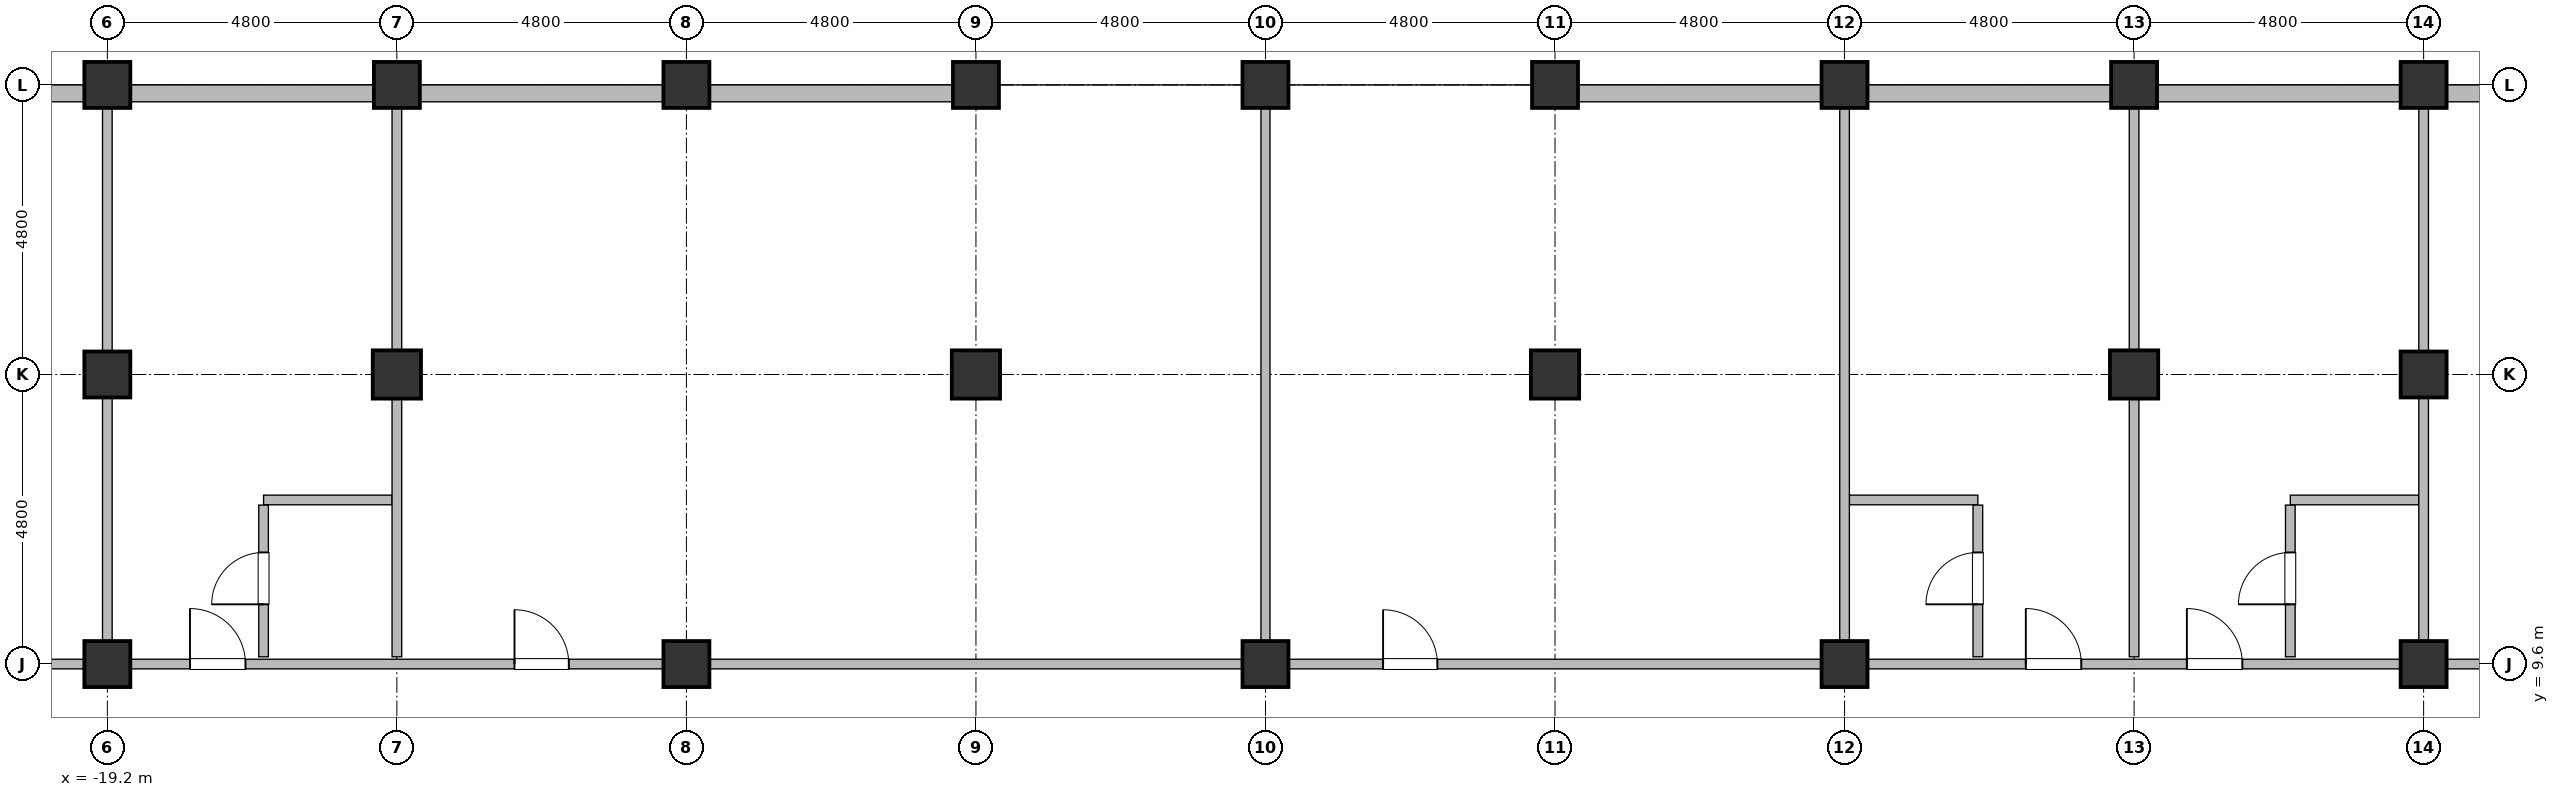
"""IFC4 building model, lengths in metres.
Left out: names, types, materials, properties, quantities, classifications, styles, units other than length and angle.
Written with IfcOpenShell. Run it as: python <this file> out.ifc"""

import sys

from ifc_helpers import new_model, si_unit, direction, frame, frame_2d, origin, origin_2d, place, context, subcontext, project, spatial, rectangle, hollow_rectangle, hollow_circle, extrude, element, fill, save


model = new_model("IFC4")
c1 = context("Model", 3, precision=1e-05, world=origin(), true_north=direction((0.0, 1.0)))
c2 = subcontext(c1, "Body", "Model", "MODEL_VIEW")
j1 = project(units=[si_unit("LENGTHUNIT", "METRE"), si_unit("PLANEANGLEUNIT", "RADIAN")], contexts=[c1])
p1 = place(None, origin())
s1 = spatial("IfcSite", under=j1, at=p1, CompositionType="ELEMENT")
p2 = place(p1, origin())
s2 = spatial("IfcBuilding", under=s1, at=p2, CompositionType="ELEMENT")
p3 = place(p2, frame((0.0, 0.0, 48.5)))
s3 = spatial("IfcBuildingStorey", under=s2, at=p3, CompositionType="ELEMENT", Elevation=48.5)
for number, where, z_axis, x_axis in (
    (1, (-19.2, 9.6, 0.0), (0.0, 0.0, 1.0), (1.0, 0.0, 0.0)),
    (2, (-19.2, 14.4, 0.0), (0.0, 0.0, 1.0), (1.0, 0.0, 0.0)),
    (3, (-19.2, 19.2, 0.0), (0.0, 0.0, 1.0), (1.0, 0.0, 0.0)),
):
    element("IfcColumn", number, at=place(p3, frame(where, z_axis=z_axis, x_axis=x_axis)), inside=s3, PredefinedType="COLUMN", context=c2, shape_type="SweptSolid", body=[
        extrude(hollow_circle(Radius=0.381, WallThickness=0.032, at=origin_2d()), origin(), (0.0, 0.0, 1.0), 3.7),
    ])
p4 = place(p3, frame((-14.4, 14.4, 0.0), z_axis=(0.0, 0.0, 1.0), x_axis=(1.0, 0.0, 0.0)))
e4 = element("IfcColumn", 4, at=p4, inside=s3, PredefinedType="COLUMN", context=c2, shape_type="SweptSolid", body=[
    extrude(hollow_rectangle(XDim=0.8, YDim=0.8, WallThickness=0.036, at=origin_2d()), origin(), (0.0, 0.0, 1.0), 3.7),
])
for number, where, z_axis, x_axis in (
    (5, (-14.4, 19.2, 0.0), (0.0, 0.0, 1.0), (1.0, 0.0, 0.0)),
    (6, (-9.6, 9.6, 0.0), (0.0, 0.0, 1.0), (1.0, 0.0, 0.0)),
    (7, (-9.6, 19.2, 0.0), (0.0, 0.0, 1.0), (1.0, 0.0, 0.0)),
):
    element("IfcColumn", number, at=place(p3, frame(where, z_axis=z_axis, x_axis=x_axis)), inside=s3, PredefinedType="COLUMN", context=c2, shape_type="SweptSolid", body=[
        extrude(hollow_circle(Radius=0.381, WallThickness=0.032, at=origin_2d()), origin(), (0.0, 0.0, 1.0), 3.7),
    ])
p5 = place(p3, frame((-4.8, 14.4, 0.0), z_axis=(0.0, 0.0, 1.0), x_axis=(1.0, 0.0, 0.0)))
e8 = element("IfcColumn", 8, at=p5, inside=s3, PredefinedType="COLUMN", context=c2, shape_type="SweptSolid", body=[
    extrude(hollow_rectangle(XDim=0.8, YDim=0.8, WallThickness=0.036, at=origin_2d()), origin(), (0.0, 0.0, 1.0), 3.7),
])
for number, where, z_axis, x_axis in (
    (9, (-4.8, 19.2, 0.0), (0.0, 0.0, 1.0), (1.0, 0.0, 0.0)),
    (10, (0.0, 9.6, 0.0), (0.0, 0.0, 1.0), (1.0, 0.0, 0.0)),
    (11, (0.0, 19.2, 0.0), (0.0, 0.0, 1.0), (1.0, 0.0, 0.0)),
):
    element("IfcColumn", number, at=place(p3, frame(where, z_axis=z_axis, x_axis=x_axis)), inside=s3, PredefinedType="COLUMN", context=c2, shape_type="SweptSolid", body=[
        extrude(hollow_circle(Radius=0.381, WallThickness=0.032, at=origin_2d()), origin(), (0.0, 0.0, 1.0), 3.7),
    ])
p6 = place(p3, frame((4.8, 14.4, 0.0), z_axis=(0.0, 0.0, 1.0), x_axis=(1.0, 0.0, 0.0)))
e12 = element("IfcColumn", 12, at=p6, inside=s3, PredefinedType="COLUMN", context=c2, shape_type="SweptSolid", body=[
    extrude(hollow_rectangle(XDim=0.8, YDim=0.8, WallThickness=0.036, at=origin_2d()), origin(), (0.0, 0.0, 1.0), 3.7),
])
for number, where, z_axis, x_axis in (
    (13, (4.8, 19.2, 0.0), (0.0, 0.0, 1.0), (1.0, 0.0, 0.0)),
    (14, (9.6, 9.6, 0.0), (0.0, 0.0, 1.0), (1.0, 0.0, 0.0)),
    (15, (9.6, 19.2, 0.0), (0.0, 0.0, 1.0), (1.0, 0.0, 0.0)),
):
    element("IfcColumn", number, at=place(p3, frame(where, z_axis=z_axis, x_axis=x_axis)), inside=s3, PredefinedType="COLUMN", context=c2, shape_type="SweptSolid", body=[
        extrude(hollow_circle(Radius=0.381, WallThickness=0.032, at=origin_2d()), origin(), (0.0, 0.0, 1.0), 3.7),
    ])
p7 = place(p3, frame((14.4, 14.4, 0.0), z_axis=(0.0, 0.0, 1.0), x_axis=(1.0, 0.0, 0.0)))
e16 = element("IfcColumn", 16, at=p7, inside=s3, PredefinedType="COLUMN", context=c2, shape_type="SweptSolid", body=[
    extrude(hollow_rectangle(XDim=0.8, YDim=0.8, WallThickness=0.036, at=origin_2d()), origin(), (0.0, 0.0, 1.0), 3.7),
])
for number, where, z_axis, x_axis in (
    (17, (14.4, 19.2, 0.0), (0.0, 0.0, 1.0), (1.0, 0.0, 0.0)),
    (18, (19.2, 9.6, 0.0), (0.0, 0.0, 1.0), (1.0, 0.0, 0.0)),
    (19, (19.2, 14.4, 0.0), (0.0, 0.0, 1.0), (1.0, 0.0, 0.0)),
    (20, (19.2, 19.2, 0.0), (0.0, 0.0, 1.0), (1.0, 0.0, 0.0)),
):
    element("IfcColumn", number, at=place(p3, frame(where, z_axis=z_axis, x_axis=x_axis)), inside=s3, PredefinedType="COLUMN", context=c2, shape_type="SweptSolid", body=[
        extrude(hollow_circle(Radius=0.381, WallThickness=0.032, at=origin_2d()), origin(), (0.0, 0.0, 1.0), 3.7),
    ])
p8 = place(p3, frame((-30.0, 19.06, 0.0), z_axis=(0.0, 0.0, 1.0), x_axis=(1.0, 0.0, 0.0)))
e21 = element("IfcWall", 21, at=p8, inside=s3, PredefinedType="SOLIDWALL", context=c2, shape_type="SweptSolid", body=[
    extrude(rectangle(XDim=25.25, YDim=0.28, at=frame_2d((12.625, 0.0))), origin(), (0.0, 0.0, 1.0), 2.12),
])
p9 = place(p8, frame((9.0, 0.0, 0.75)))
e22 = element("IfcOpeningElement", 22, at=p9, cuts=e21, PredefinedType="OPENING", context=c2, shape_type="SweptSolid", body=[
    extrude(rectangle(XDim=1.2, YDim=1.15, at=frame_2d((0.6, 0.575))), frame((0.0, 0.155, 0.0), z_axis=(0.0, -1.0, 0.0), x_axis=(1.0, 0.0, 0.0)), (0.0, 0.0, 1.0), 0.31),
])
p10 = place(p8, frame((12.3, 0.0, 0.75)))
e23 = element("IfcOpeningElement", 23, at=p10, cuts=e21, PredefinedType="OPENING", context=c2, shape_type="SweptSolid", body=[
    extrude(rectangle(XDim=1.8, YDim=1.15, at=frame_2d((0.9, 0.575))), frame((0.0, 0.155, 0.0), z_axis=(0.0, -1.0, 0.0), x_axis=(1.0, 0.0, 0.0)), (0.0, 0.0, 1.0), 0.31),
])
p11 = place(p3, frame((4.75, 19.06, 0.0), z_axis=(0.0, 0.0, 1.0), x_axis=(1.0, 0.0, 0.0)))
e24 = element("IfcWall", 24, at=p11, inside=s3, PredefinedType="SOLIDWALL", context=c2, shape_type="SweptSolid", body=[
    extrude(rectangle(XDim=20.45, YDim=0.28, at=frame_2d((10.225, 0.0))), origin(), (0.0, 0.0, 1.0), 2.62),
])
p12 = place(p11, frame((6.35, 0.0, 0.75)))
e25 = element("IfcOpeningElement", 25, at=p12, cuts=e24, PredefinedType="OPENING", context=c2, shape_type="SweptSolid", body=[
    extrude(rectangle(XDim=1.8, YDim=1.7, at=frame_2d((0.9, 0.85))), frame((0.0, 0.155, 0.0), z_axis=(0.0, -1.0, 0.0), x_axis=(1.0, 0.0, 0.0)), (0.0, 0.0, 1.0), 0.31),
])
p13 = place(p11, frame((11.15, 0.0, 0.75)))
e26 = element("IfcOpeningElement", 26, at=p13, cuts=e24, PredefinedType="OPENING", context=c2, shape_type="SweptSolid", body=[
    extrude(rectangle(XDim=1.8, YDim=1.7, at=frame_2d((0.9, 0.85))), frame((0.0, 0.155, 0.0), z_axis=(0.0, -1.0, 0.0), x_axis=(1.0, 0.0, 0.0)), (0.0, 0.0, 1.0), 0.31),
])
p14 = place(p3, frame((-33.43, 9.6, 0.0), z_axis=(0.0, 0.0, 1.0), x_axis=(1.0, 0.0, 0.0)))
e27 = element("IfcWall", 27, at=p14, inside=s3, PredefinedType="PARTITIONING", context=c2, shape_type="SweptSolid", body=[
    extrude(rectangle(XDim=62.06, YDim=0.16, at=frame_2d((31.03, 0.0))), origin(), (0.0, 0.0, 1.0), 2.62),
])
p15 = place(p14, frame((6.8, 0.0, 0.0)))
e28 = element("IfcOpeningElement", 28, at=p15, cuts=e27, PredefinedType="OPENING", context=c2, shape_type="SweptSolid", body=[
    extrude(rectangle(XDim=0.9, YDim=2.1, at=frame_2d((0.45, 1.05))), frame((0.0, 0.095, 0.0), z_axis=(0.0, -1.0, 0.0), x_axis=(1.0, 0.0, 0.0)), (0.0, 0.0, 1.0), 0.19),
])
p16 = place(p14, frame((54.361, 0.0, 0.0)))
e29 = element("IfcOpeningElement", 29, at=p16, cuts=e27, PredefinedType="OPENING", context=c2, shape_type="SweptSolid", body=[
    extrude(rectangle(XDim=0.9, YDim=2.1, at=frame_2d((0.45, 1.05))), frame((0.0, 0.095, 0.0), z_axis=(0.0, -1.0, 0.0), x_axis=(1.0, 0.0, 0.0)), (0.0, 0.0, 1.0), 0.19),
])
p17 = place(p14, frame((10.69, 0.0, 0.0)))
e30 = element("IfcOpeningElement", 30, at=p17, cuts=e27, PredefinedType="OPENING", context=c2, shape_type="SweptSolid", body=[
    extrude(rectangle(XDim=0.9, YDim=2.1, at=frame_2d((0.45, 1.05))), frame((0.0, 0.095, 0.0), z_axis=(0.0, -1.0, 0.0), x_axis=(1.0, 0.0, 0.0)), (0.0, 0.0, 1.0), 0.19),
])
p18 = place(p14, frame((12.07, 0.0, 0.0)))
e31 = element("IfcOpeningElement", 31, at=p18, cuts=e27, PredefinedType="OPENING", context=c2, shape_type="SweptSolid", body=[
    extrude(rectangle(XDim=0.9, YDim=2.1, at=frame_2d((0.45, 1.05))), frame((0.0, 0.095, 0.0), z_axis=(0.0, -1.0, 0.0), x_axis=(1.0, 0.0, 0.0)), (0.0, 0.0, 1.0), 0.19),
])
p19 = place(p14, frame((15.6, 0.0, 0.0)))
e32 = element("IfcOpeningElement", 32, at=p19, cuts=e27, PredefinedType="OPENING", context=c2, shape_type="SweptSolid", body=[
    extrude(rectangle(XDim=0.92, YDim=2.15, at=frame_2d((0.46, 1.075))), frame((0.0, 0.095, 0.0), z_axis=(0.0, -1.0, 0.0), x_axis=(1.0, 0.0, 0.0)), (0.0, 0.0, 1.0), 0.19),
])
p20 = place(p14, frame((20.98, 0.0, 0.0)))
e33 = element("IfcOpeningElement", 33, at=p20, cuts=e27, PredefinedType="OPENING", context=c2, shape_type="SweptSolid", body=[
    extrude(rectangle(XDim=0.9, YDim=2.1, at=frame_2d((0.45, 1.05))), frame((0.0, 0.095, 0.0), z_axis=(0.0, -1.0, 0.0), x_axis=(1.0, 0.0, 0.0)), (0.0, 0.0, 1.0), 0.19),
])
p21 = place(p14, frame((35.38, 0.0, 0.0)))
e34 = element("IfcOpeningElement", 34, at=p21, cuts=e27, PredefinedType="OPENING", context=c2, shape_type="SweptSolid", body=[
    extrude(rectangle(XDim=0.9, YDim=2.1, at=frame_2d((0.45, 1.05))), frame((0.0, 0.095, 0.0), z_axis=(0.0, -1.0, 0.0), x_axis=(1.0, 0.0, 0.0)), (0.0, 0.0, 1.0), 0.19),
])
p22 = place(p14, frame((46.035, 0.0, 0.0)))
e35 = element("IfcOpeningElement", 35, at=p22, cuts=e27, PredefinedType="OPENING", context=c2, shape_type="SweptSolid", body=[
    extrude(rectangle(XDim=0.92, YDim=2.15, at=frame_2d((0.46, 1.075))), frame((0.0, 0.095, 0.0), z_axis=(0.0, -1.0, 0.0), x_axis=(1.0, 0.0, 0.0)), (0.0, 0.0, 1.0), 0.19),
])
p23 = place(p14, frame((48.705, 0.0, 0.0)))
e36 = element("IfcOpeningElement", 36, at=p23, cuts=e27, PredefinedType="OPENING", context=c2, shape_type="SweptSolid", body=[
    extrude(rectangle(XDim=0.92, YDim=2.15, at=frame_2d((0.46, 1.075))), frame((0.0, 0.095, 0.0), z_axis=(0.0, -1.0, 0.0), x_axis=(1.0, 0.0, 0.0)), (0.0, 0.0, 1.0), 0.19),
])
p24 = place(p3, frame((-16.61, 12.32, 0.0), z_axis=(0.0, 0.0, 1.0), x_axis=(1.0, 0.0, 0.0)))
e37 = element("IfcWall", 37, at=p24, inside=s3, PredefinedType="PARTITIONING", context=c2, shape_type="SweptSolid", body=[
    extrude(rectangle(XDim=2.13, YDim=0.16, at=frame_2d((1.065, 0.0))), origin(), (0.0, 0.0, 1.0), 2.82),
])
p25 = place(p3, frame((9.68, 12.32, 0.0), z_axis=(0.0, 0.0, 1.0), x_axis=(1.0, 0.0, 0.0)))
e38 = element("IfcWall", 38, at=p25, inside=s3, PredefinedType="PARTITIONING", context=c2, shape_type="SweptSolid", body=[
    extrude(rectangle(XDim=2.13, YDim=0.16, at=frame_2d((1.065, 0.0))), origin(), (0.0, 0.0, 1.0), 3.07),
])
p26 = place(p3, frame((16.99, 12.32, 0.0), z_axis=(0.0, 0.0, 1.0), x_axis=(1.0, 0.0, 0.0)))
e39 = element("IfcWall", 39, at=p26, inside=s3, PredefinedType="PARTITIONING", context=c2, shape_type="SweptSolid", body=[
    extrude(rectangle(XDim=2.13, YDim=0.16, at=frame_2d((1.065, 0.0))), origin(), (0.0, 0.0, 1.0), 2.82),
])
p27 = place(p3, frame((-19.2, 9.72, 0.0), z_axis=(0.0, 0.0, 1.0), x_axis=(0.0, 1.0, 0.0)))
e40 = element("IfcWall", 40, at=p27, inside=s3, PredefinedType="PARTITIONING", context=c2, shape_type="SweptSolid", body=[
    extrude(rectangle(XDim=9.19, YDim=0.16, at=frame_2d((4.595, 0.0))), origin(), (0.0, 0.0, 1.0), 2.62),
])
p28 = place(p3, frame((-16.61, 9.72, 0.0), z_axis=(0.0, 0.0, 1.0), x_axis=(0.0, 1.0, 0.0)))
e41 = element("IfcWall", 41, at=p28, inside=s3, PredefinedType="PARTITIONING", context=c2, shape_type="SweptSolid", body=[
    extrude(rectangle(XDim=2.515, YDim=0.16, at=frame_2d((1.258, 0.0))), origin(), (0.0, 0.0, 1.0), 2.62),
])
p29 = place(p28, frame((0.87, 0.0, 0.0)))
e42 = element("IfcOpeningElement", 42, at=p29, cuts=e41, PredefinedType="OPENING", context=c2, shape_type="SweptSolid", body=[
    extrude(rectangle(XDim=0.86, YDim=2.1, at=frame_2d((0.43, 1.05))), frame((0.0, 0.095, 0.0), z_axis=(0.0, -1.0, 0.0), x_axis=(1.0, 0.0, 0.0)), (0.0, 0.0, 1.0), 0.19),
])
p30 = place(p3, frame((-14.4, 9.72, 0.0), z_axis=(0.0, 0.0, 1.0), x_axis=(0.0, 1.0, 0.0)))
e43 = element("IfcWall", 43, at=p30, inside=s3, PredefinedType="PARTITIONING", context=c2, shape_type="SweptSolid", body=[
    extrude(rectangle(XDim=9.19, YDim=0.16, at=frame_2d((4.595, 0.0))), origin(), (0.0, 0.0, 1.0), 2.62),
])
p31 = place(p3, frame((0.0, 9.72, 0.0), z_axis=(0.0, 0.0, 1.0), x_axis=(0.0, 1.0, 0.0)))
e44 = element("IfcWall", 44, at=p31, inside=s3, PredefinedType="PARTITIONING", context=c2, shape_type="SweptSolid", body=[
    extrude(rectangle(XDim=9.275, YDim=0.15, at=frame_2d((4.638, 0.0))), origin(), (0.0, 0.0, 1.0), 2.62),
])
p32 = place(p3, frame((9.6, 9.72, 0.0), z_axis=(0.0, 0.0, 1.0), x_axis=(0.0, 1.0, 0.0)))
e45 = element("IfcWall", 45, at=p32, inside=s3, PredefinedType="PARTITIONING", context=c2, shape_type="SweptSolid", body=[
    extrude(rectangle(XDim=9.19, YDim=0.16, at=frame_2d((4.595, 0.0))), origin(), (0.0, 0.0, 1.0), 2.62),
])
p33 = place(p3, frame((11.81, 9.72, 0.0), z_axis=(0.0, 0.0, 1.0), x_axis=(0.0, 1.0, 0.0)))
e46 = element("IfcWall", 46, at=p33, inside=s3, PredefinedType="PARTITIONING", context=c2, shape_type="SweptSolid", body=[
    extrude(rectangle(XDim=2.515, YDim=0.16, at=frame_2d((1.258, 0.0))), origin(), (0.0, 0.0, 1.0), 2.62),
])
p34 = place(p33, frame((0.87, 0.0, 0.0)))
e47 = element("IfcOpeningElement", 47, at=p34, cuts=e46, PredefinedType="OPENING", context=c2, shape_type="SweptSolid", body=[
    extrude(rectangle(XDim=0.86, YDim=2.1, at=frame_2d((0.43, 1.05))), frame((0.0, 0.095, 0.0), z_axis=(0.0, -1.0, 0.0), x_axis=(1.0, 0.0, 0.0)), (0.0, 0.0, 1.0), 0.19),
])
p35 = place(p3, frame((14.4, 9.72, 0.0), z_axis=(0.0, 0.0, 1.0), x_axis=(0.0, 1.0, 0.0)))
e48 = element("IfcWall", 48, at=p35, inside=s3, PredefinedType="PARTITIONING", context=c2, shape_type="SweptSolid", body=[
    extrude(rectangle(XDim=9.19, YDim=0.16, at=frame_2d((4.595, 0.0))), origin(), (0.0, 0.0, 1.0), 2.62),
])
p36 = place(p3, frame((16.99, 9.72, 0.0), z_axis=(0.0, 0.0, 1.0), x_axis=(0.0, 1.0, 0.0)))
e49 = element("IfcWall", 49, at=p36, inside=s3, PredefinedType="PARTITIONING", context=c2, shape_type="SweptSolid", body=[
    extrude(rectangle(XDim=2.515, YDim=0.16, at=frame_2d((1.258, 0.0))), origin(), (0.0, 0.0, 1.0), 2.62),
])
p37 = place(p36, frame((0.87, 0.0, 0.0)))
e50 = element("IfcOpeningElement", 50, at=p37, cuts=e49, PredefinedType="OPENING", context=c2, shape_type="SweptSolid", body=[
    extrude(rectangle(XDim=0.86, YDim=2.1, at=frame_2d((0.43, 1.05))), frame((0.0, 0.095, 0.0), z_axis=(0.0, -1.0, 0.0), x_axis=(1.0, 0.0, 0.0)), (0.0, 0.0, 1.0), 0.19),
])
p38 = place(p3, frame((19.2, 9.72, 0.0), z_axis=(0.0, 0.0, 1.0), x_axis=(0.0, 1.0, 0.0)))
e51 = element("IfcWall", 51, at=p38, inside=s3, PredefinedType="PARTITIONING", context=c2, shape_type="SweptSolid", body=[
    extrude(rectangle(XDim=9.19, YDim=0.16, at=frame_2d((4.595, 0.0))), origin(), (0.0, 0.0, 1.0), 2.62),
])
p39 = place(p9, origin())
e52 = element("IfcWindow", 52, at=p39, inside=s3, PartitioningType="SINGLE_PANEL", PredefinedType="WINDOW", context=c2, shape_type="SweptSolid", body=[
    extrude(rectangle(XDim=1.2, YDim=1.15, at=frame_2d((0.6, 0.575))), frame((0.0, 0.03, 0.0), z_axis=(0.0, -1.0, 0.0), x_axis=(1.0, 0.0, 0.0)), (0.0, 0.0, 1.0), 0.06),
])
fill(e22, e52)
p40 = place(p10, origin())
e53 = element("IfcWindow", 53, at=p40, inside=s3, PartitioningType="SINGLE_PANEL", PredefinedType="WINDOW", context=c2, shape_type="SweptSolid", body=[
    extrude(rectangle(XDim=1.8, YDim=1.15, at=frame_2d((0.9, 0.575))), frame((0.0, 0.03, 0.0), z_axis=(0.0, -1.0, 0.0), x_axis=(1.0, 0.0, 0.0)), (0.0, 0.0, 1.0), 0.06),
])
fill(e23, e53)
p41 = place(p12, origin())
e54 = element("IfcWindow", 54, at=p41, inside=s3, PartitioningType="SINGLE_PANEL", PredefinedType="WINDOW", context=c2, shape_type="SweptSolid", body=[
    extrude(rectangle(XDim=1.8, YDim=1.7, at=frame_2d((0.9, 0.85))), frame((0.0, 0.03, 0.0), z_axis=(0.0, -1.0, 0.0), x_axis=(1.0, 0.0, 0.0)), (0.0, 0.0, 1.0), 0.06),
])
fill(e25, e54)
p42 = place(p13, origin())
e55 = element("IfcWindow", 55, at=p42, inside=s3, PartitioningType="SINGLE_PANEL", PredefinedType="WINDOW", context=c2, shape_type="SweptSolid", body=[
    extrude(rectangle(XDim=1.8, YDim=1.7, at=frame_2d((0.9, 0.85))), frame((0.0, 0.03, 0.0), z_axis=(0.0, -1.0, 0.0), x_axis=(1.0, 0.0, 0.0)), (0.0, 0.0, 1.0), 0.06),
])
fill(e26, e55)
p43 = place(p19, origin())
e56 = element("IfcDoor", 56, at=p43, inside=s3, OperationType="SINGLE_SWING_RIGHT", PredefinedType="DOOR", context=c2, shape_type="SweptSolid", body=[
    extrude(rectangle(XDim=0.92, YDim=2.15, at=frame_2d((0.46, 1.075))), frame((0.0, 0.025, 0.0), z_axis=(0.0, -1.0, 0.0), x_axis=(1.0, 0.0, 0.0)), (0.0, 0.0, 1.0), 0.05),
])
fill(e32, e56)
p44 = place(p29, origin())
e57 = element("IfcDoor", 57, at=p44, inside=s3, OperationType="SINGLE_SWING_RIGHT", PredefinedType="DOOR", context=c2, shape_type="SweptSolid", body=[
    extrude(rectangle(XDim=0.86, YDim=2.1, at=frame_2d((0.43, 1.05))), frame((0.0, 0.025, 0.0), z_axis=(0.0, -1.0, 0.0), x_axis=(1.0, 0.0, 0.0)), (0.0, 0.0, 1.0), 0.05),
])
fill(e42, e57)
p45 = place(p20, origin())
e58 = element("IfcDoor", 58, at=p45, inside=s3, OperationType="SINGLE_SWING_RIGHT", PredefinedType="DOOR", context=c2, shape_type="SweptSolid", body=[
    extrude(rectangle(XDim=0.9, YDim=2.1, at=frame_2d((0.45, 1.05))), frame((0.0, 0.025, 0.0), z_axis=(0.0, -1.0, 0.0), x_axis=(1.0, 0.0, 0.0)), (0.0, 0.0, 1.0), 0.05),
])
fill(e33, e58)
p46 = place(p21, origin())
e59 = element("IfcDoor", 59, at=p46, inside=s3, OperationType="SINGLE_SWING_LEFT", PredefinedType="DOOR", context=c2, shape_type="SweptSolid", body=[
    extrude(rectangle(XDim=0.9, YDim=2.1, at=frame_2d((0.45, 1.05))), frame((0.0, 0.025, 0.0), z_axis=(0.0, -1.0, 0.0), x_axis=(1.0, 0.0, 0.0)), (0.0, 0.0, 1.0), 0.05),
])
fill(e34, e59)
p47 = place(p22, origin())
e60 = element("IfcDoor", 60, at=p47, inside=s3, OperationType="SINGLE_SWING_RIGHT", PredefinedType="DOOR", context=c2, shape_type="SweptSolid", body=[
    extrude(rectangle(XDim=0.92, YDim=2.15, at=frame_2d((0.46, 1.075))), frame((0.0, 0.025, 0.0), z_axis=(0.0, -1.0, 0.0), x_axis=(1.0, 0.0, 0.0)), (0.0, 0.0, 1.0), 0.05),
])
fill(e35, e60)
p48 = place(p34, origin())
e61 = element("IfcDoor", 61, at=p48, inside=s3, OperationType="SINGLE_SWING_LEFT", PredefinedType="DOOR", context=c2, shape_type="SweptSolid", body=[
    extrude(rectangle(XDim=0.86, YDim=2.1, at=frame_2d((0.43, 1.05))), frame((0.0, 0.025, 0.0), z_axis=(0.0, -1.0, 0.0), x_axis=(1.0, 0.0, 0.0)), (0.0, 0.0, 1.0), 0.05),
])
fill(e47, e61)
p49 = place(p23, origin())
e62 = element("IfcDoor", 62, at=p49, inside=s3, OperationType="SINGLE_SWING_RIGHT", PredefinedType="DOOR", context=c2, shape_type="SweptSolid", body=[
    extrude(rectangle(XDim=0.92, YDim=2.15, at=frame_2d((0.46, 1.075))), frame((0.0, 0.025, 0.0), z_axis=(0.0, -1.0, 0.0), x_axis=(1.0, 0.0, 0.0)), (0.0, 0.0, 1.0), 0.05),
])
fill(e36, e62)
p50 = place(p37, origin())
e63 = element("IfcDoor", 63, at=p50, inside=s3, OperationType="SINGLE_SWING_LEFT", PredefinedType="DOOR", context=c2, shape_type="SweptSolid", body=[
    extrude(rectangle(XDim=0.86, YDim=2.1, at=frame_2d((0.43, 1.05))), frame((0.0, 0.025, 0.0), z_axis=(0.0, -1.0, 0.0), x_axis=(1.0, 0.0, 0.0)), (0.0, 0.0, 1.0), 0.05),
])
fill(e50, e63)
save(model, sys.argv[1])
